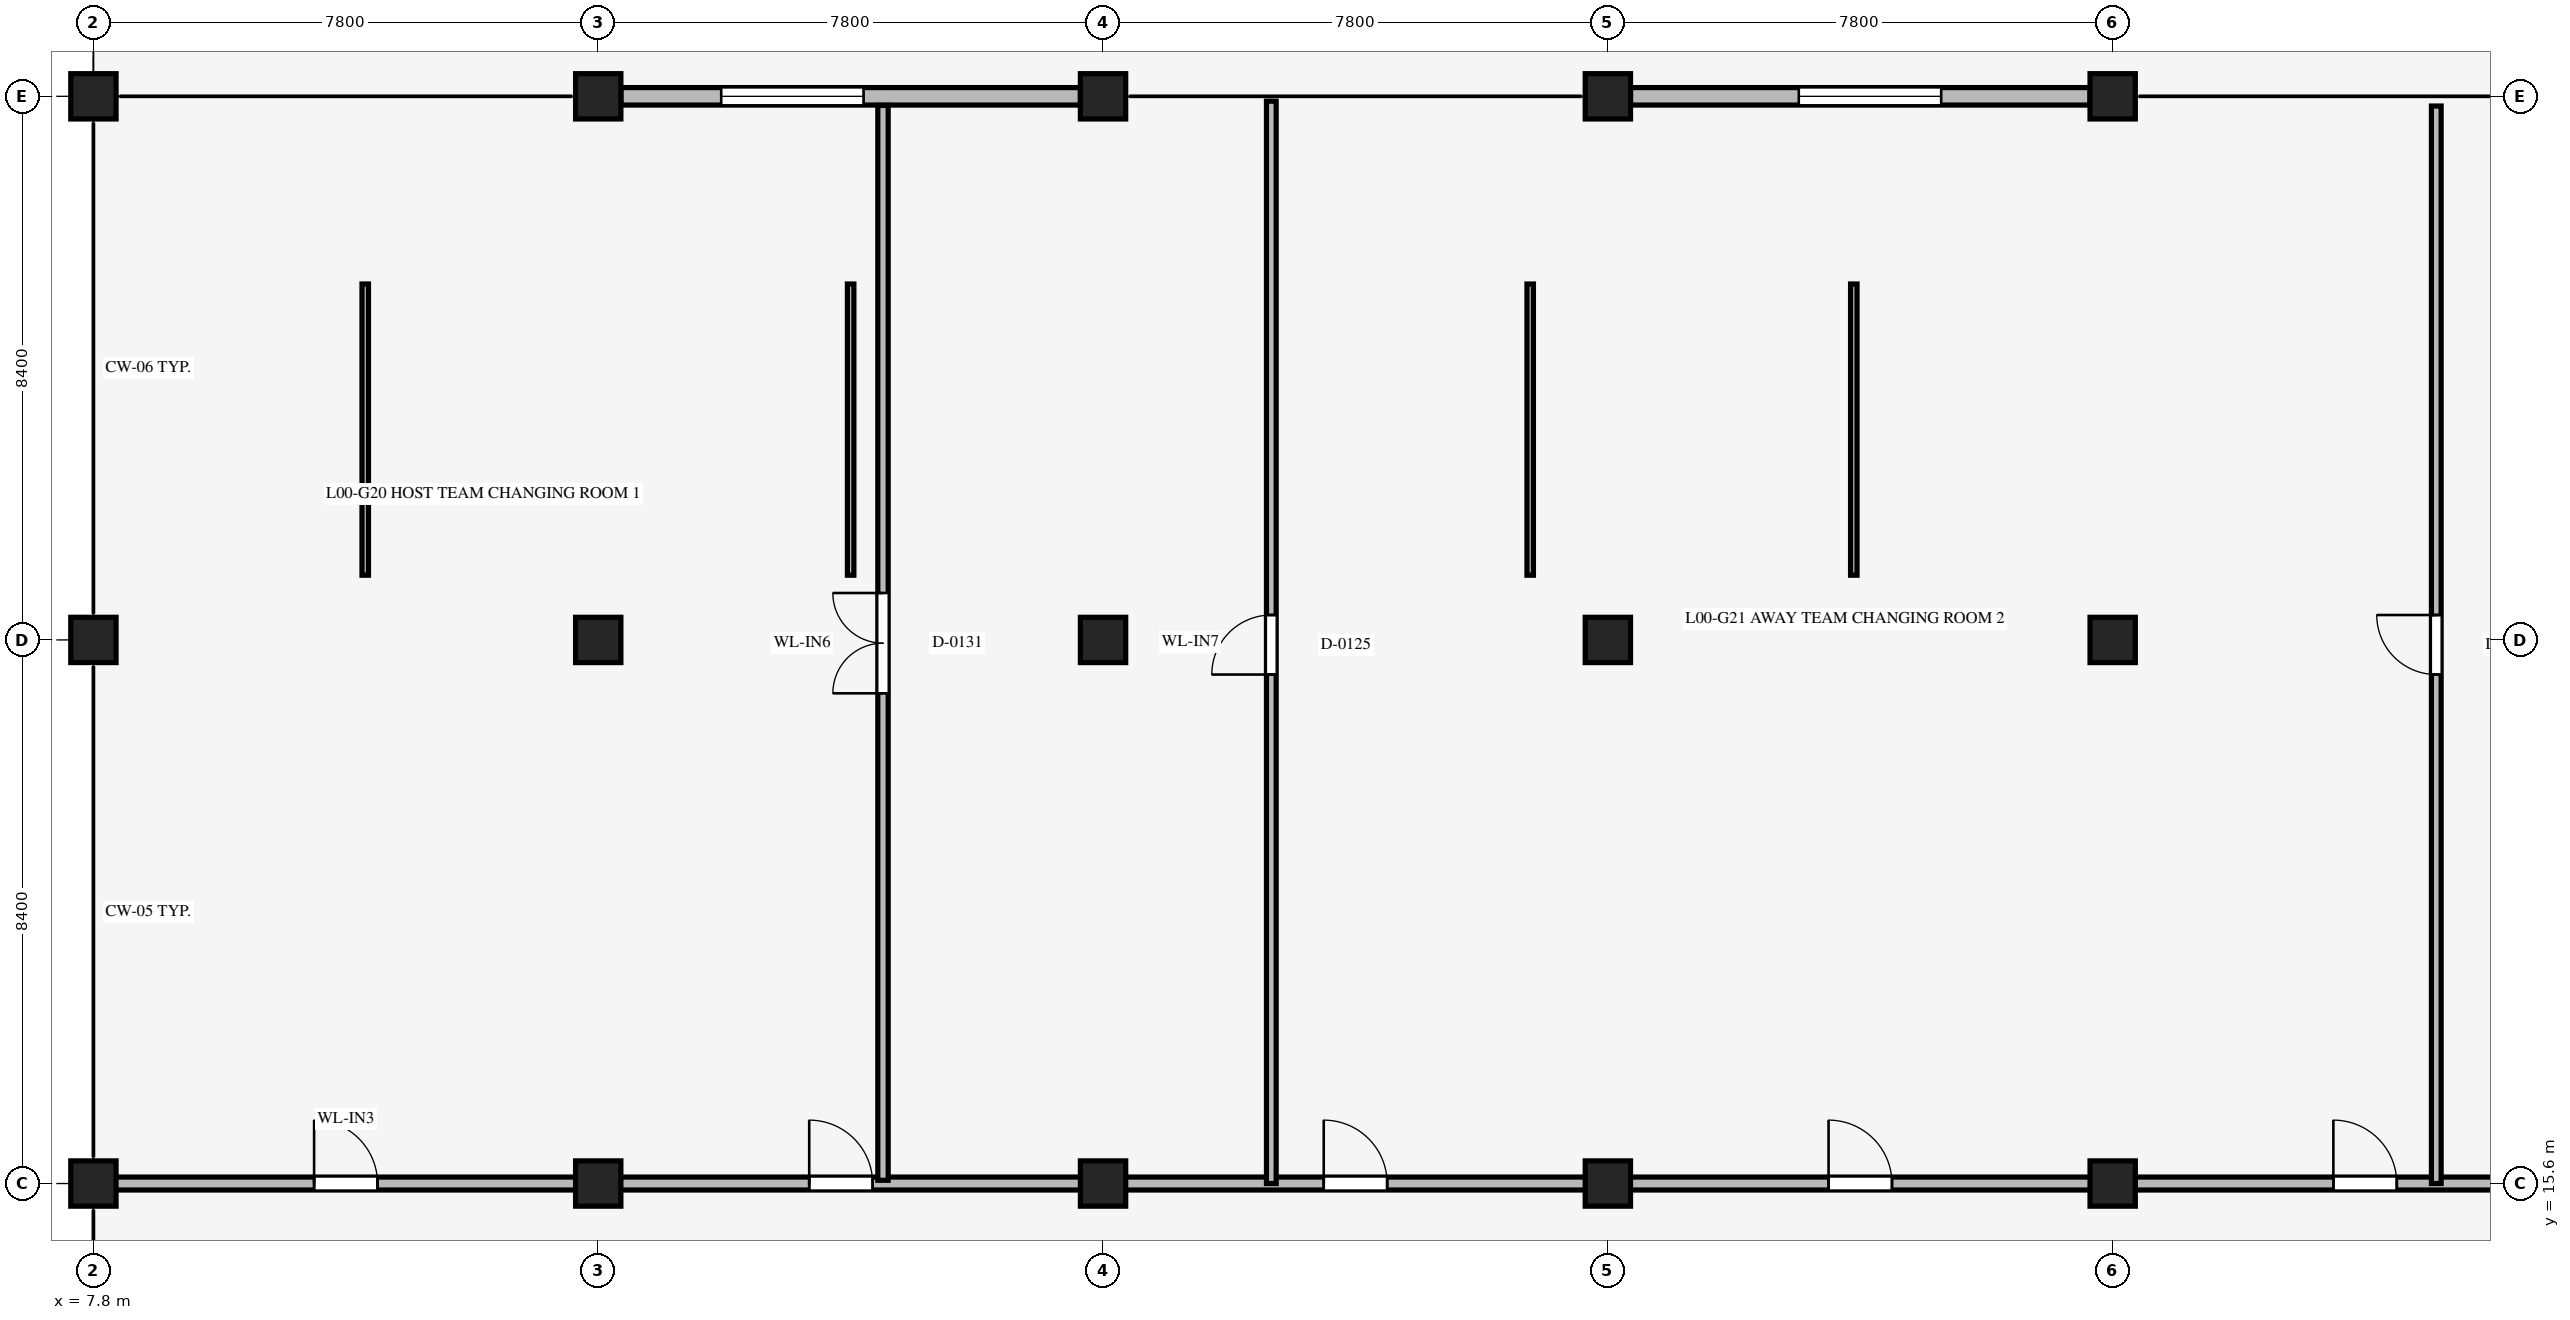
"""IFC4 building model, lengths in metres.
Left out: names, types, materials, properties, quantities, classifications, styles, units other than length and angle.
Written with IfcOpenShell. Run it as: python <this file> out.ifc"""

import sys

from ifc_helpers import new_model, si_unit, direction, frame, frame_2d, origin, origin_2d, place, context, subcontext, project, spatial, rectangle, extrude, element, fill, save


model = new_model("IFC4")
c1 = context("Model", 3, precision=1e-05, world=origin(), true_north=direction((0.0, 1.0)))
c2 = subcontext(c1, "Body", "Model", "MODEL_VIEW")
j1 = project(units=[si_unit("LENGTHUNIT", "METRE"), si_unit("PLANEANGLEUNIT", "RADIAN")], contexts=[c1])
p1 = place(None, origin())
s1 = spatial("IfcSite", under=j1, at=p1, CompositionType="ELEMENT")
p2 = place(p1, origin())
s2 = spatial("IfcBuilding", under=s1, at=p2, CompositionType="ELEMENT")
p3 = place(p2, origin())
s3 = spatial("IfcBuildingStorey", under=s2, at=p3, CompositionType="ELEMENT", Elevation=0.0)
for number, where, z_axis, x_axis in (
    (1, (7.8, 15.6, 0.0), (0.0, 0.0, 1.0), (1.0, 0.0, 0.0)),
    (2, (7.8, 24.0, 0.0), (0.0, 0.0, 1.0), (1.0, 0.0, 0.0)),
    (3, (7.8, 32.4, 0.0), (0.0, 0.0, 1.0), (1.0, 0.0, 0.0)),
    (4, (15.6, 15.6, 0.0), (0.0, 0.0, 1.0), (1.0, 0.0, 0.0)),
    (5, (15.6, 24.0, 0.0), (0.0, 0.0, 1.0), (1.0, 0.0, 0.0)),
    (6, (15.6, 32.4, 0.0), (0.0, 0.0, 1.0), (1.0, 0.0, 0.0)),
    (7, (23.4, 15.6, 0.0), (0.0, 0.0, 1.0), (1.0, 0.0, 0.0)),
    (8, (23.4, 24.0, 0.0), (0.0, 0.0, 1.0), (1.0, 0.0, 0.0)),
    (9, (23.4, 32.4, 0.0), (0.0, 0.0, 1.0), (1.0, 0.0, 0.0)),
    (10, (31.2, 15.6, 0.0), (0.0, 0.0, 1.0), (1.0, 0.0, 0.0)),
    (11, (31.2, 24.0, 0.0), (0.0, 0.0, 1.0), (1.0, 0.0, 0.0)),
    (12, (31.2, 32.4, 0.0), (0.0, 0.0, 1.0), (1.0, 0.0, 0.0)),
    (13, (39.0, 15.6, 0.0), (0.0, 0.0, 1.0), (1.0, 0.0, 0.0)),
    (14, (39.0, 24.0, 0.0), (0.0, 0.0, 1.0), (1.0, 0.0, 0.0)),
    (15, (39.0, 32.4, 0.0), (0.0, 0.0, 1.0), (1.0, 0.0, 0.0)),
):
    element("IfcColumn", number, at=place(p3, frame(where, z_axis=z_axis, x_axis=x_axis)), inside=s3, PredefinedType="COLUMN", context=c2, shape_type="SweptSolid", body=[
        extrude(rectangle(XDim=0.7, YDim=0.7, at=origin_2d()), origin(), (0.0, 0.0, 1.0), 6.0),
    ])
p4 = place(p3, frame((15.95, 32.4, 0.0), z_axis=(0.0, 0.0, 1.0), x_axis=(1.0, 0.0, 0.0)))
e16 = element("IfcWall", 16, at=p4, inside=s3, PredefinedType="STANDARD", context=c2, shape_type="SweptSolid", body=[
    extrude(rectangle(XDim=7.1, YDim=0.27, at=frame_2d((3.55, 0.0))), origin(), (0.0, 0.0, 1.0), 5.381),
])
p5 = place(p4, frame((1.55, 0.0, 0.95)))
e17 = element("IfcOpeningElement", 17, at=p5, cuts=e16, PredefinedType="OPENING", context=c2, shape_type="SweptSolid", body=[
    extrude(rectangle(XDim=2.2, YDim=1.9, at=frame_2d((1.1, 0.95))), frame((0.0, 0.145, 0.0), z_axis=(0.0, -1.0, 0.0), x_axis=(1.0, 0.0, 0.0)), (0.0, 0.0, 1.0), 0.29),
])
p6 = place(p3, frame((31.55, 32.4, 0.0), z_axis=(0.0, 0.0, 1.0), x_axis=(1.0, 0.0, 0.0)))
e18 = element("IfcWall", 18, at=p6, inside=s3, PredefinedType="STANDARD", context=c2, shape_type="SweptSolid", body=[
    extrude(rectangle(XDim=7.1, YDim=0.27, at=frame_2d((3.55, 0.0))), origin(), (0.0, 0.0, 1.0), 5.381),
])
p7 = place(p6, frame((2.6, 0.0, 0.95)))
e19 = element("IfcOpeningElement", 19, at=p7, cuts=e18, PredefinedType="OPENING", context=c2, shape_type="SweptSolid", body=[
    extrude(rectangle(XDim=2.2, YDim=1.9, at=frame_2d((1.1, 0.95))), frame((0.0, 0.145, 0.0), z_axis=(0.0, -1.0, 0.0), x_axis=(1.0, 0.0, 0.0)), (0.0, 0.0, 1.0), 0.29),
])
p8 = place(p3, frame((8.1, 15.6, 0.0), z_axis=(0.0, 0.0, 1.0), x_axis=(1.0, 0.0, 0.0)))
e20 = element("IfcWall", 20, at=p8, inside=s3, PredefinedType="STANDARD", context=c2, shape_type="SweptSolid", body=[
    extrude(rectangle(XDim=7.2, YDim=0.2, at=frame_2d((3.6, 0.0))), origin(), (0.0, 0.0, 1.0), 3.05),
])
p9 = place(p8, frame((3.11, 0.0, 0.0)))
e21 = element("IfcOpeningElement", 21, at=p9, cuts=e20, PredefinedType="OPENING", context=c2, shape_type="SweptSolid", body=[
    extrude(rectangle(XDim=0.98, YDim=2.15, at=frame_2d((0.49, 1.075))), frame((0.0, 0.11, 0.0), z_axis=(0.0, -1.0, 0.0), x_axis=(1.0, 0.0, 0.0)), (0.0, 0.0, 1.0), 0.22),
])
p10 = place(p3, frame((15.9, 15.6, 0.0), z_axis=(0.0, 0.0, 1.0), x_axis=(1.0, 0.0, 0.0)))
e22 = element("IfcWall", 22, at=p10, inside=s3, PredefinedType="STANDARD", context=c2, shape_type="SweptSolid", body=[
    extrude(rectangle(XDim=7.2, YDim=0.2, at=frame_2d((3.6, 0.0))), origin(), (0.0, 0.0, 1.0), 3.05),
])
p11 = place(p10, frame((2.96, 0.0, 0.0)))
e23 = element("IfcOpeningElement", 23, at=p11, cuts=e22, PredefinedType="OPENING", context=c2, shape_type="SweptSolid", body=[
    extrude(rectangle(XDim=0.98, YDim=2.15, at=frame_2d((0.49, 1.075))), frame((0.0, 0.11, 0.0), z_axis=(0.0, -1.0, 0.0), x_axis=(1.0, 0.0, 0.0)), (0.0, 0.0, 1.0), 0.22),
])
p12 = place(p3, frame((23.7, 15.6, 0.0), z_axis=(0.0, 0.0, 1.0), x_axis=(1.0, 0.0, 0.0)))
e24 = element("IfcWall", 24, at=p12, inside=s3, PredefinedType="STANDARD", context=c2, shape_type="SweptSolid", body=[
    extrude(rectangle(XDim=7.2, YDim=0.2, at=frame_2d((3.6, 0.0))), origin(), (0.0, 0.0, 1.0), 3.05),
])
p13 = place(p12, frame((3.11, 0.0, 0.0)))
e25 = element("IfcOpeningElement", 25, at=p13, cuts=e24, PredefinedType="OPENING", context=c2, shape_type="SweptSolid", body=[
    extrude(rectangle(XDim=0.98, YDim=2.15, at=frame_2d((0.49, 1.075))), frame((0.0, 0.11, 0.0), z_axis=(0.0, -1.0, 0.0), x_axis=(1.0, 0.0, 0.0)), (0.0, 0.0, 1.0), 0.22),
])
p14 = place(p3, frame((31.5, 15.6, 0.0), z_axis=(0.0, 0.0, 1.0), x_axis=(1.0, 0.0, 0.0)))
e26 = element("IfcWall", 26, at=p14, inside=s3, PredefinedType="STANDARD", context=c2, shape_type="SweptSolid", body=[
    extrude(rectangle(XDim=7.2, YDim=0.2, at=frame_2d((3.6, 0.0))), origin(), (0.0, 0.0, 1.0), 3.05),
])
p15 = place(p14, frame((3.11, 0.0, 0.0)))
e27 = element("IfcOpeningElement", 27, at=p15, cuts=e26, PredefinedType="OPENING", context=c2, shape_type="SweptSolid", body=[
    extrude(rectangle(XDim=0.98, YDim=2.15, at=frame_2d((0.49, 1.075))), frame((0.0, 0.11, 0.0), z_axis=(0.0, -1.0, 0.0), x_axis=(1.0, 0.0, 0.0)), (0.0, 0.0, 1.0), 0.22),
])
p16 = place(p3, frame((39.3, 15.6, 0.0), z_axis=(0.0, 0.0, 1.0), x_axis=(1.0, 0.0, 0.0)))
e28 = element("IfcWall", 28, at=p16, inside=s3, PredefinedType="STANDARD", context=c2, shape_type="SweptSolid", body=[
    extrude(rectangle(XDim=7.2, YDim=0.2, at=frame_2d((3.6, 0.0))), origin(), (0.0, 0.0, 1.0), 3.05),
])
p17 = place(p16, frame((3.11, 0.0, 0.0)))
e29 = element("IfcOpeningElement", 29, at=p17, cuts=e28, PredefinedType="OPENING", context=c2, shape_type="SweptSolid", body=[
    extrude(rectangle(XDim=0.98, YDim=2.15, at=frame_2d((0.49, 1.075))), frame((0.0, 0.11, 0.0), z_axis=(0.0, -1.0, 0.0), x_axis=(1.0, 0.0, 0.0)), (0.0, 0.0, 1.0), 0.22),
])
p18 = place(p3, frame((26.0, 15.6, 0.0), z_axis=(0.0, 0.0, 1.0), x_axis=(0.0, 1.0, 0.0)))
e30 = element("IfcWall", 30, at=p18, inside=s3, PredefinedType="STANDARD", context=c2, shape_type="SweptSolid", body=[
    extrude(rectangle(XDim=16.725, YDim=0.15, at=frame_2d((8.362, 0.0))), origin(), (0.0, 0.0, 1.0), 3.05),
])
p19 = place(p18, frame((7.865, 0.0, 0.0)))
e31 = element("IfcOpeningElement", 31, at=p19, cuts=e30, PredefinedType="OPENING", context=c2, shape_type="SweptSolid", body=[
    extrude(rectangle(XDim=0.92, YDim=2.15, at=frame_2d((0.46, 1.075))), frame((0.0, 0.085, 0.0), z_axis=(0.0, -1.0, 0.0), x_axis=(1.0, 0.0, 0.0)), (0.0, 0.0, 1.0), 0.17),
])
p20 = place(p3, frame((44.0, 15.6, 0.0), z_axis=(0.0, 0.0, 1.0), x_axis=(0.0, 1.0, 0.0)))
e32 = element("IfcWall", 32, at=p20, inside=s3, PredefinedType="STANDARD", context=c2, shape_type="SweptSolid", body=[
    extrude(rectangle(XDim=16.65, YDim=0.15, at=frame_2d((8.325, 0.0))), origin(), (0.0, 0.0, 1.0), 3.05),
])
p21 = place(p20, frame((7.865, 0.0, 0.0)))
e33 = element("IfcOpeningElement", 33, at=p21, cuts=e32, PredefinedType="OPENING", context=c2, shape_type="SweptSolid", body=[
    extrude(rectangle(XDim=0.92, YDim=2.15, at=frame_2d((0.46, 1.075))), frame((0.0, 0.085, 0.0), z_axis=(0.0, -1.0, 0.0), x_axis=(1.0, 0.0, 0.0)), (0.0, 0.0, 1.0), 0.17),
])
p22 = place(p3, frame((20.0, 15.65, 0.0), z_axis=(0.0, 0.0, 1.0), x_axis=(0.0, 1.0, 0.0)))
e34 = element("IfcWall", 34, at=p22, inside=s3, PredefinedType="STANDARD", context=c2, shape_type="SweptSolid", body=[
    extrude(rectangle(XDim=16.61, YDim=0.16, at=frame_2d((8.305, 0.0))), origin(), (0.0, 0.0, 1.0), 3.05),
])
p23 = place(p22, frame((7.525, 0.0, 0.0)))
e35 = element("IfcOpeningElement", 35, at=p23, cuts=e34, PredefinedType="OPENING", context=c2, shape_type="SweptSolid", body=[
    extrude(rectangle(XDim=1.55, YDim=2.25, at=frame_2d((0.775, 1.125))), frame((0.0, 0.09, 0.0), z_axis=(0.0, -1.0, 0.0), x_axis=(1.0, 0.0, 0.0)), (0.0, 0.0, 1.0), 0.18),
])
for number, where, z_axis, x_axis in (
    (36, (12.0, 25.0, 0.0), (0.0, 0.0, 1.0), (0.0, 1.0, 0.0)),
    (37, (19.5, 25.0, 0.0), (0.0, 0.0, 1.0), (0.0, 1.0, 0.0)),
    (38, (30.0, 25.0, 0.0), (0.0, 0.0, 1.0), (0.0, 1.0, 0.0)),
    (39, (35.0, 25.0, 0.0), (0.0, 0.0, 1.0), (0.0, 1.0, 0.0)),
):
    element("IfcWall", number, at=place(p3, frame(where, z_axis=z_axis, x_axis=x_axis)), inside=s3, PredefinedType="STANDARD", context=c2, shape_type="SweptSolid", body=[
        extrude(rectangle(XDim=4.5, YDim=0.1, at=frame_2d((2.25, 0.0))), origin(), (0.0, 0.0, 1.0), 3.05),
    ])
p24 = place(p5, origin())
e40 = element("IfcWindow", 40, at=p24, inside=s3, PartitioningType="SINGLE_PANEL", PredefinedType="WINDOW", context=c2, shape_type="SweptSolid", body=[
    extrude(rectangle(XDim=2.2, YDim=1.9, at=frame_2d((1.1, 0.95))), frame((0.0, 0.03, 0.0), z_axis=(0.0, -1.0, 0.0), x_axis=(1.0, 0.0, 0.0)), (0.0, 0.0, 1.0), 0.06),
])
fill(e17, e40)
p25 = place(p7, origin())
e41 = element("IfcWindow", 41, at=p25, inside=s3, PartitioningType="SINGLE_PANEL", PredefinedType="WINDOW", context=c2, shape_type="SweptSolid", body=[
    extrude(rectangle(XDim=2.2, YDim=1.9, at=frame_2d((1.1, 0.95))), frame((0.0, 0.03, 0.0), z_axis=(0.0, -1.0, 0.0), x_axis=(1.0, 0.0, 0.0)), (0.0, 0.0, 1.0), 0.06),
])
fill(e19, e41)
p26 = place(p9, origin())
e42 = element("IfcDoor", 42, at=p26, inside=s3, OperationType="SINGLE_SWING_LEFT", PredefinedType="DOOR", context=c2, shape_type="SweptSolid", body=[
    extrude(rectangle(XDim=0.98, YDim=2.15, at=frame_2d((0.49, 1.075))), frame((0.0, 0.025, 0.0), z_axis=(0.0, -1.0, 0.0), x_axis=(1.0, 0.0, 0.0)), (0.0, 0.0, 1.0), 0.05),
])
fill(e21, e42)
p27 = place(p11, origin())
e43 = element("IfcDoor", 43, at=p27, inside=s3, OperationType="SINGLE_SWING_LEFT", PredefinedType="DOOR", context=c2, shape_type="SweptSolid", body=[
    extrude(rectangle(XDim=0.98, YDim=2.15, at=frame_2d((0.49, 1.075))), frame((0.0, 0.025, 0.0), z_axis=(0.0, -1.0, 0.0), x_axis=(1.0, 0.0, 0.0)), (0.0, 0.0, 1.0), 0.05),
])
fill(e23, e43)
p28 = place(p13, origin())
e44 = element("IfcDoor", 44, at=p28, inside=s3, OperationType="SINGLE_SWING_LEFT", PredefinedType="DOOR", context=c2, shape_type="SweptSolid", body=[
    extrude(rectangle(XDim=0.98, YDim=2.15, at=frame_2d((0.49, 1.075))), frame((0.0, 0.025, 0.0), z_axis=(0.0, -1.0, 0.0), x_axis=(1.0, 0.0, 0.0)), (0.0, 0.0, 1.0), 0.05),
])
fill(e25, e44)
p29 = place(p15, origin())
e45 = element("IfcDoor", 45, at=p29, inside=s3, OperationType="SINGLE_SWING_LEFT", PredefinedType="DOOR", context=c2, shape_type="SweptSolid", body=[
    extrude(rectangle(XDim=0.98, YDim=2.15, at=frame_2d((0.49, 1.075))), frame((0.0, 0.025, 0.0), z_axis=(0.0, -1.0, 0.0), x_axis=(1.0, 0.0, 0.0)), (0.0, 0.0, 1.0), 0.05),
])
fill(e27, e45)
p30 = place(p17, origin())
e46 = element("IfcDoor", 46, at=p30, inside=s3, OperationType="SINGLE_SWING_LEFT", PredefinedType="DOOR", context=c2, shape_type="SweptSolid", body=[
    extrude(rectangle(XDim=0.98, YDim=2.15, at=frame_2d((0.49, 1.075))), frame((0.0, 0.025, 0.0), z_axis=(0.0, -1.0, 0.0), x_axis=(1.0, 0.0, 0.0)), (0.0, 0.0, 1.0), 0.05),
])
fill(e29, e46)
p31 = place(p19, origin())
e47 = element("IfcDoor", 47, at=p31, inside=s3, OperationType="SINGLE_SWING_LEFT", PredefinedType="DOOR", context=c2, shape_type="SweptSolid", body=[
    extrude(rectangle(XDim=0.92, YDim=2.15, at=frame_2d((0.46, 1.075))), frame((0.0, 0.025, 0.0), z_axis=(0.0, -1.0, 0.0), x_axis=(1.0, 0.0, 0.0)), (0.0, 0.0, 1.0), 0.05),
])
fill(e31, e47)
p32 = place(p21, origin())
e48 = element("IfcDoor", 48, at=p32, inside=s3, OperationType="SINGLE_SWING_RIGHT", PredefinedType="DOOR", context=c2, shape_type="SweptSolid", body=[
    extrude(rectangle(XDim=0.92, YDim=2.15, at=frame_2d((0.46, 1.075))), frame((0.0, 0.025, 0.0), z_axis=(0.0, -1.0, 0.0), x_axis=(1.0, 0.0, 0.0)), (0.0, 0.0, 1.0), 0.05),
])
fill(e33, e48)
p33 = place(p23, origin())
e49 = element("IfcDoor", 49, at=p33, inside=s3, OperationType="DOUBLE_DOOR_SINGLE_SWING", PredefinedType="DOOR", context=c2, shape_type="SweptSolid", body=[
    extrude(rectangle(XDim=1.55, YDim=2.25, at=frame_2d((0.775, 1.125))), frame((0.0, 0.025, 0.0), z_axis=(0.0, -1.0, 0.0), x_axis=(1.0, 0.0, 0.0)), (0.0, 0.0, 1.0), 0.05),
])
fill(e35, e49)
save(model, sys.argv[1])
